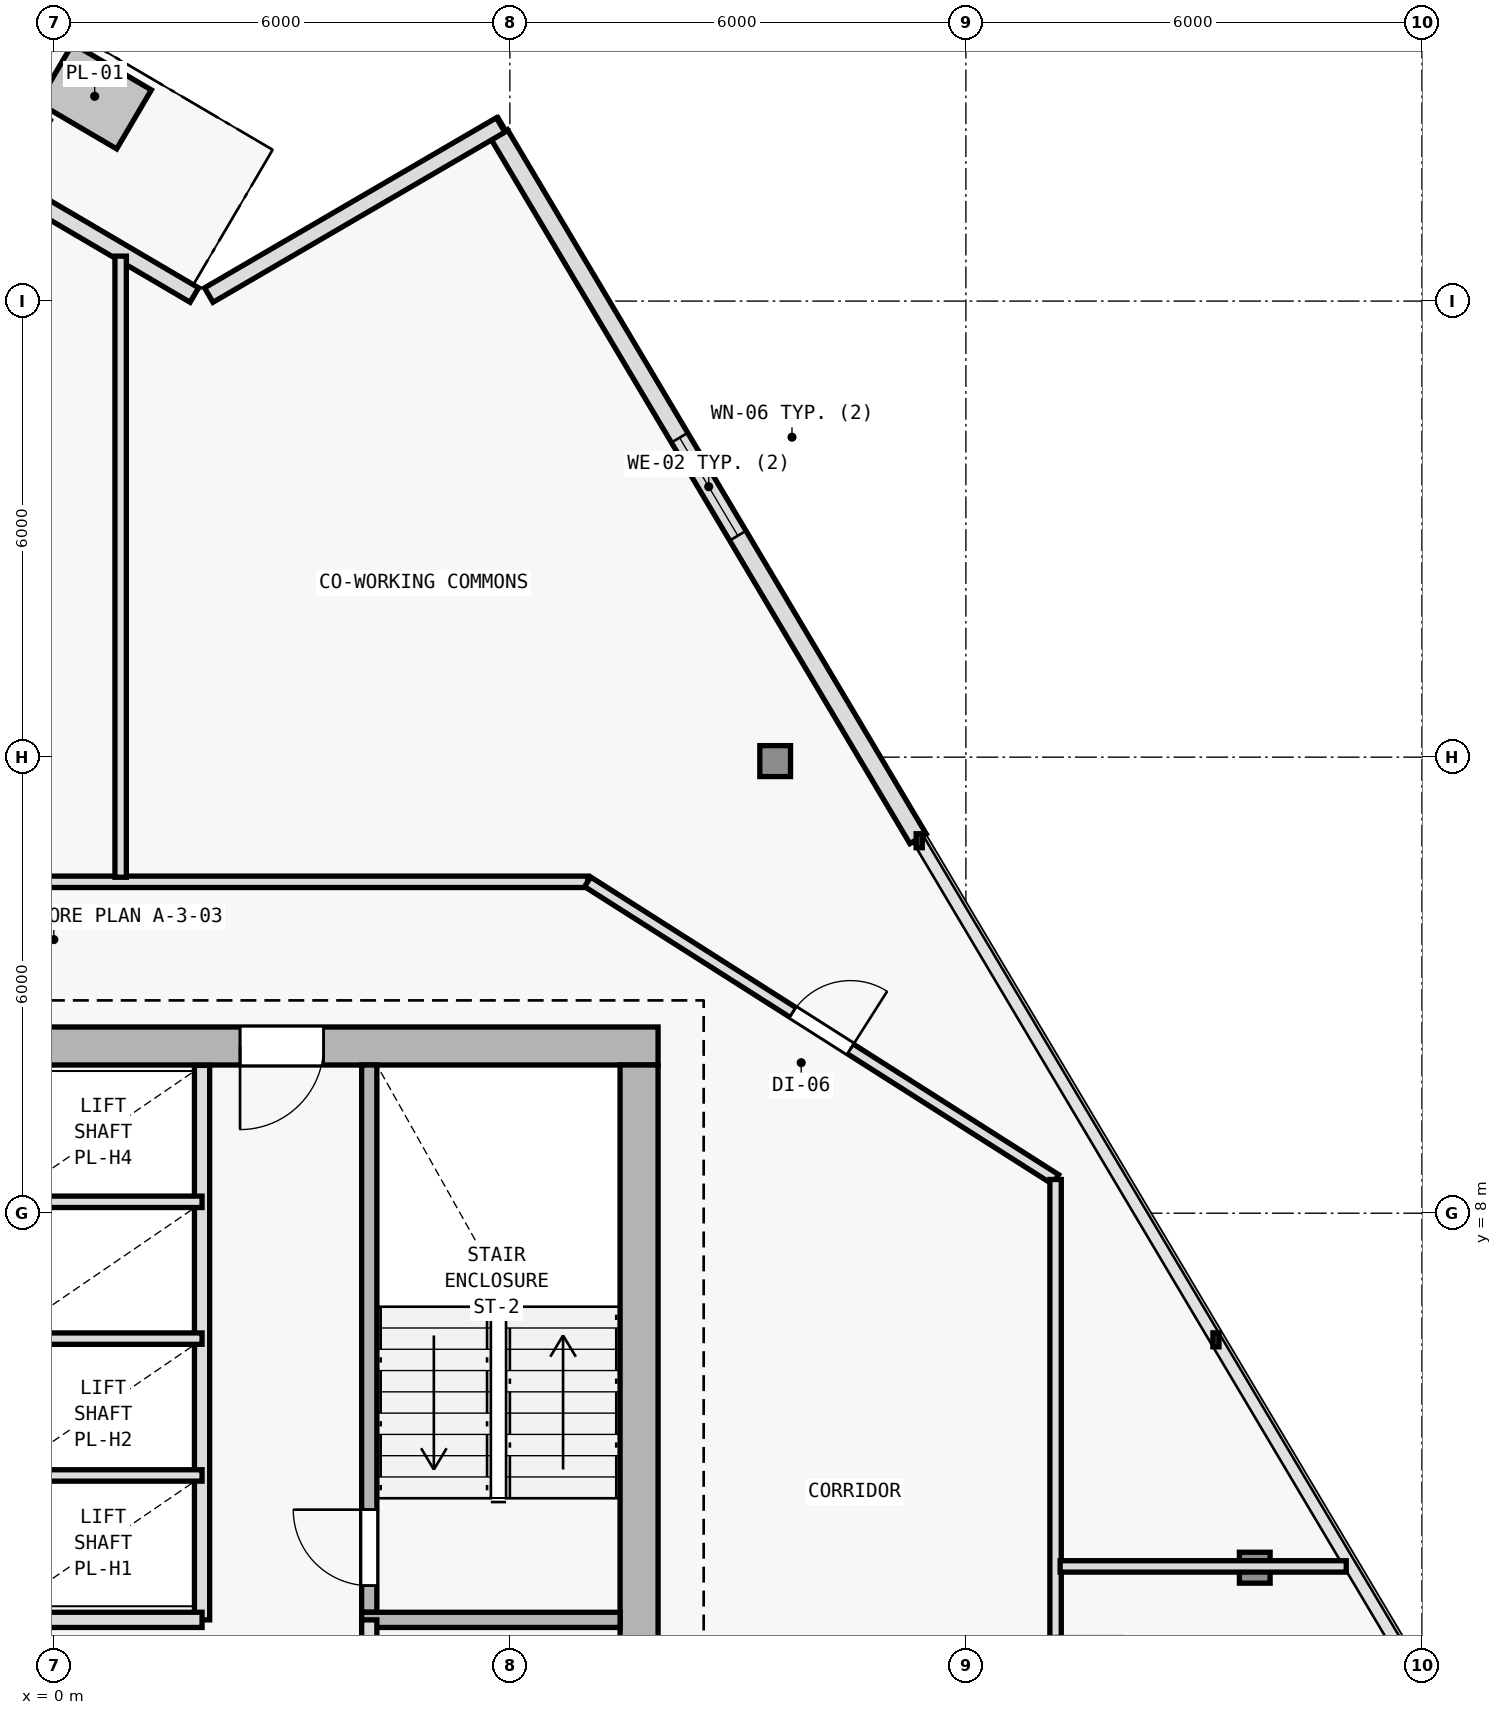
"""IFC4 building model, lengths in metres.
Left out: names, types, materials, properties, quantities, classifications, styles, units other than length and angle.
Written with IfcOpenShell. Run it as: python <this file> out.ifc"""

import sys

from ifc_helpers import new_model, si_unit, direction, frame, frame_2d, origin, origin_2d, place, context, subcontext, project, spatial, rectangle, i_section, extrude, element, fill, save


model = new_model("IFC4")
c1 = context("Model", 3, precision=1e-05, world=origin(), true_north=direction((0.0, 1.0)))
c2 = subcontext(c1, "Body", "Model", "MODEL_VIEW")
j1 = project(units=[si_unit("LENGTHUNIT", "METRE"), si_unit("PLANEANGLEUNIT", "RADIAN")], contexts=[c1])
p1 = place(None, origin())
s1 = spatial("IfcSite", under=j1, at=p1, CompositionType="ELEMENT")
p2 = place(p1, origin())
s2 = spatial("IfcBuilding", under=s1, at=p2, CompositionType="ELEMENT")
p3 = place(p2, frame((0.0, 0.0, 149.4)))
s3 = spatial("IfcBuildingStorey", under=s2, at=p3, CompositionType="ELEMENT", Elevation=149.4)
p4 = place(p3, frame((7.7, 10.2, 0.0), z_axis=(0.0, 0.0, 1.0), x_axis=(1.0, 0.0, 0.0)))
e1 = element("IfcColumn", 1, at=p4, inside=s3, PredefinedType="COLUMN", context=c2, shape_type="SweptSolid", body=[
    extrude(i_section(OverallWidth=0.404, OverallDepth=0.407, WebThickness=0.017, FlangeThickness=0.028, FilletRadius=0.015, at=origin_2d()), origin(), (0.0, 0.0, 1.0), 3.6),
])
p5 = place(p3, frame((15.801, 3.336, 0.006), z_axis=(-0.018907314261, 0.009589680974, 0.999775250487), x_axis=(-0.452339157861, -0.891845999187, 0.0)))
e2 = element("IfcColumn", 2, at=p5, inside=s3, PredefinedType="COLUMN", context=c2, shape_type="SweptSolid", body=[
    extrude(i_section(OverallWidth=0.404, OverallDepth=0.407, WebThickness=0.017, FlangeThickness=0.028, FilletRadius=0.015, at=origin_2d()), origin(), (0.0, 0.0, 1.0), 3.59),
])
p6 = place(p3, frame((9.49, 13.948, 0.006), z_axis=(-0.011699840322, -0.002584848443, 0.999928213571), x_axis=(0.215728093413, -0.976453475447, 0.0)))
e3 = element("IfcColumn", 3, at=p6, inside=s3, PredefinedType="COLUMN", context=c2, shape_type="SweptSolid", body=[
    extrude(i_section(OverallWidth=0.404, OverallDepth=0.407, WebThickness=0.017, FlangeThickness=0.028, FilletRadius=0.015, at=origin_2d()), origin(), (0.0, 0.0, 1.0), 3.589),
])
p7 = place(p3, frame((5.862, 22.19, 0.0), z_axis=(0.0, 0.0, 1.0), x_axis=(0.511083986456, -0.859530778267, 0.0)))
e4 = element("IfcWall", 4, at=p7, inside=s3, PredefinedType="SOLIDWALL", context=c2, shape_type="SweptSolid", body=[
    extrude(rectangle(XDim=10.778, YDim=0.25, at=frame_2d((5.389, 0.0))), origin(), (0.0, 0.0, 1.0), 3.35),
])
p8 = place(p7, frame((4.639, 0.0, 0.62)))
e5 = element("IfcOpeningElement", 5, at=p8, cuts=e4, PredefinedType="OPENING", context=c2, shape_type="SweptSolid", body=[
    extrude(rectangle(XDim=1.5, YDim=2.0, at=frame_2d((0.75, 1.0))), frame((0.0, 0.135, 0.0), z_axis=(0.0, -1.0, 0.0), x_axis=(1.0, 0.0, 0.0)), (0.0, 0.0, 1.0), 0.27),
])
p9 = place(p3, frame((2.039, 20.079, 0.0), z_axis=(0.0, 0.0, 1.0), x_axis=(0.86398603623, 0.503515768571, 0.0)))
e6 = element("IfcWall", 6, at=p9, inside=s3, PredefinedType="SOLIDWALL", context=c2, shape_type="SweptSolid", body=[
    extrude(rectangle(XDim=4.444, YDim=0.22, at=frame_2d((2.222, 0.0))), origin(), (0.0, 0.0, 1.0), 3.35),
])
p10 = place(p3, frame((-2.385, 22.567, 0.0), z_axis=(0.0, 0.0, 1.0), x_axis=(0.8621258938, -0.506694131839, 0.0)))
e7 = element("IfcWall", 7, at=p10, inside=s3, PredefinedType="SOLIDWALL", context=c2, shape_type="SweptSolid", body=[
    extrude(rectangle(XDim=4.91, YDim=0.22, at=frame_2d((2.455, 0.0))), origin(), (0.0, 0.0, 1.0), 3.35),
])
p11 = place(p10, frame((1.08, 0.0, 0.0)))
e8 = element("IfcOpeningElement", 8, at=p11, cuts=e7, PredefinedType="OPENING", context=c2, shape_type="SweptSolid", body=[
    extrude(rectangle(XDim=1.05, YDim=2.15, at=frame_2d((0.525, 1.075))), frame((0.0, 0.12, 0.0), z_axis=(0.0, -1.0, 0.0), x_axis=(1.0, 0.0, 0.0)), (0.0, 0.0, 1.0), 0.24),
])
p12 = place(p3, frame((7.95, 10.2, 0.0), z_axis=(0.0, 0.0, 1.0), x_axis=(-1.0, 0.0, 0.0)))
e9 = element("IfcWall", 9, at=p12, inside=s3, PredefinedType="SHEAR", context=c2, shape_type="SweptSolid", body=[
    extrude(rectangle(XDim=15.9, YDim=0.5, at=frame_2d((7.95, 0.0))), origin(), (0.0, 0.0, 1.0), 3.35),
])
p13 = place(p12, frame((4.4, 0.0, 0.0)))
e10 = element("IfcOpeningElement", 10, at=p13, cuts=e9, PredefinedType="OPENING", context=c2, shape_type="SweptSolid", body=[
    extrude(rectangle(XDim=1.1, YDim=2.15, at=frame_2d((0.55, 1.075))), frame((0.0, 0.26, 0.0), z_axis=(0.0, -1.0, 0.0), x_axis=(1.0, 0.0, 0.0)), (0.0, 0.0, 1.0), 0.52),
])
p14 = place(p3, frame((7.7, 9.95, 0.0), z_axis=(0.0, 0.0, 1.0), x_axis=(0.0, -1.0, 0.0)))
e11 = element("IfcWall", 11, at=p14, inside=s3, PredefinedType="SHEAR", context=c2, shape_type="SweptSolid", body=[
    extrude(rectangle(XDim=19.1, YDim=0.5, at=frame_2d((9.55, 0.0))), origin(), (0.0, 0.0, 1.0), 3.35),
])
p15 = place(p3, frame((4.15, 2.75, 0.0), z_axis=(0.0, 0.0, 1.0), x_axis=(0.0, 1.0, 0.0)))
e12 = element("IfcWall", 12, at=p15, inside=s3, PredefinedType="SOLIDWALL", context=c2, shape_type="SweptSolid", body=[
    extrude(rectangle(XDim=7.2, YDim=0.2, at=frame_2d((3.6, 0.0))), origin(), (0.0, 0.0, 1.0), 3.35),
])
p16 = place(p15, frame((0.35, 0.0, 0.0)))
e13 = element("IfcOpeningElement", 13, at=p16, cuts=e12, PredefinedType="OPENING", context=c2, shape_type="SweptSolid", body=[
    extrude(rectangle(XDim=1.0, YDim=2.15, at=frame_2d((0.5, 1.075))), frame((0.0, 0.11, 0.0), z_axis=(0.0, -1.0, 0.0), x_axis=(1.0, 0.0, 0.0)), (0.0, 0.0, 1.0), 0.22),
])
p17 = place(p3, frame((4.05, 2.65, 0.0), z_axis=(0.0, 0.0, 1.0), x_axis=(1.0, 0.0, 0.0)))
e14 = element("IfcWall", 14, at=p17, inside=s3, PredefinedType="SOLIDWALL", context=c2, shape_type="SweptSolid", body=[
    extrude(rectangle(XDim=3.4, YDim=0.2, at=frame_2d((1.7, 0.0))), origin(), (0.0, 0.0, 1.0), 3.35),
])
p18 = place(p3, frame((4.15, -6.05, 0.0), z_axis=(0.0, 0.0, 1.0), x_axis=(0.0, 1.0, 0.0)))
e15 = element("IfcWall", 15, at=p18, inside=s3, PredefinedType="SOLIDWALL", context=c2, shape_type="SweptSolid", body=[
    extrude(rectangle(XDim=8.7, YDim=0.2, at=frame_2d((4.35, 0.0))), origin(), (0.0, 0.0, 1.0), 3.35),
])
p19 = place(p18, frame((3.6, 0.0, 0.0)))
e16 = element("IfcOpeningElement", 16, at=p19, cuts=e15, PredefinedType="OPENING", context=c2, shape_type="SweptSolid", body=[
    extrude(rectangle(XDim=0.95, YDim=2.1, at=frame_2d((0.475, 1.05))), frame((0.0, 0.11, 0.0), z_axis=(0.0, -1.0, 0.0), x_axis=(1.0, 0.0, 0.0)), (0.0, 0.0, 1.0), 0.22),
])
p20 = place(p3, frame((1.95, 2.65, 0.0), z_axis=(0.0, 0.0, 1.0), x_axis=(0.0, 1.0, 0.0)))
e17 = element("IfcWall", 17, at=p20, inside=s3, PredefinedType="SOLIDWALL", context=c2, shape_type="SweptSolid", body=[
    extrude(rectangle(XDim=7.295, YDim=0.2, at=frame_2d((3.647, 0.0))), origin(), (0.0, 0.0, 1.0), 3.35),
])
p21 = place(p3, frame((-0.95, 2.65, 0.0), z_axis=(0.0, 0.0, 1.0), x_axis=(1.0, 0.0, 0.0)))
e18 = element("IfcWall", 18, at=p21, inside=s3, PredefinedType="SOLIDWALL", context=c2, shape_type="SweptSolid", body=[
    extrude(rectangle(XDim=2.9, YDim=0.2, at=frame_2d((1.45, 0.0))), origin(), (0.0, 0.0, 1.0), 3.35),
])
for number, where, z_axis, x_axis in (
    (19, (-0.75, 4.55, 0.0), (0.0, 0.0, 1.0), (1.0, 0.0, 0.0)),
    (20, (-0.75, 6.35, 0.0), (0.0, 0.0, 1.0), (1.0, 0.0, 0.0)),
    (21, (-0.75, 8.15, 0.0), (0.0, 0.0, 1.0), (1.0, 0.0, 0.0)),
):
    element("IfcWall", number, at=place(p3, frame(where, z_axis=z_axis, x_axis=x_axis)), inside=s3, PredefinedType="PARTITIONING", context=c2, shape_type="SweptSolid", body=[
        extrude(rectangle(XDim=2.7, YDim=0.15, at=frame_2d((1.35, 0.0))), origin(), (0.0, 0.0, 1.0), 3.35),
    ])
p22 = place(p3, frame((-7.041, 12.36, 0.0), z_axis=(0.0, 0.0, 1.0), x_axis=(1.0, 0.0, 0.0)))
e22 = element("IfcWall", 22, at=p22, inside=s3, PredefinedType="PARTITIONING", context=c2, shape_type="SweptSolid", body=[
    extrude(rectangle(XDim=14.064, YDim=0.15, at=frame_2d((7.032, 0.0))), origin(), (0.0, 0.0, 1.0), 2.965),
])
p23 = place(p22, frame((3.599, 0.0, 0.0)))
e23 = element("IfcOpeningElement", 23, at=p23, cuts=e22, PredefinedType="OPENING", context=c2, shape_type="SweptSolid", body=[
    extrude(rectangle(XDim=0.9, YDim=2.1, at=frame_2d((0.45, 1.05))), frame((0.0, 0.085, 0.0), z_axis=(0.0, -1.0, 0.0), x_axis=(1.0, 0.0, 0.0)), (0.0, 0.0, 1.0), 0.17),
])
p24 = place(p3, frame((7.023, 12.36, 0.0), z_axis=(0.0, 0.0, 1.0), x_axis=(0.84376480085, -0.536713108511, 0.0)))
e24 = element("IfcWall", 24, at=p24, inside=s3, PredefinedType="PARTITIONING", context=c2, shape_type="SweptSolid", body=[
    extrude(rectangle(XDim=7.297, YDim=0.15, at=frame_2d((3.648, 0.0))), origin(), (0.0, 0.0, 1.0), 2.775),
])
p25 = place(p24, frame((3.198, 0.0, 0.0)))
e25 = element("IfcOpeningElement", 25, at=p25, cuts=e24, PredefinedType="OPENING", context=c2, shape_type="SweptSolid", body=[
    extrude(rectangle(XDim=0.9, YDim=2.1, at=frame_2d((0.45, 1.05))), frame((0.0, 0.085, 0.0), z_axis=(0.0, -1.0, 0.0), x_axis=(1.0, 0.0, 0.0)), (0.0, 0.0, 1.0), 0.17),
])
p26 = place(p3, frame((13.18, 8.444, 0.0), z_axis=(0.0, 0.0, 1.0), x_axis=(0.0, -1.0, 0.0)))
e26 = element("IfcWall", 26, at=p26, inside=s3, PredefinedType="PARTITIONING", context=c2, shape_type="SweptSolid", body=[
    extrude(rectangle(XDim=20.004, YDim=0.15, at=frame_2d((10.002, 0.0))), origin(), (0.0, 0.0, 1.0), 2.725),
])
p27 = place(p26, frame((17.303, 0.0, 0.0)))
e27 = element("IfcOpeningElement", 27, at=p27, cuts=e26, PredefinedType="OPENING", context=c2, shape_type="SweptSolid", body=[
    extrude(rectangle(XDim=0.9, YDim=2.1, at=frame_2d((0.45, 1.05))), frame((0.0, 0.085, 0.0), z_axis=(0.0, -1.0, 0.0), x_axis=(1.0, 0.0, 0.0)), (0.0, 0.0, 1.0), 0.17),
])
p28 = place(p26, frame((13.731, 0.0, 0.0)))
e28 = element("IfcOpeningElement", 28, at=p28, cuts=e26, PredefinedType="OPENING", context=c2, shape_type="SweptSolid", body=[
    extrude(rectangle(XDim=0.9, YDim=2.1, at=frame_2d((0.45, 1.05))), frame((0.0, 0.085, 0.0), z_axis=(0.0, -1.0, 0.0), x_axis=(1.0, 0.0, 0.0)), (0.0, 0.0, 1.0), 0.17),
])
p29 = place(p26, frame((10.967, 0.0, 0.0)))
e29 = element("IfcOpeningElement", 29, at=p29, cuts=e26, PredefinedType="OPENING", context=c2, shape_type="SweptSolid", body=[
    extrude(rectangle(XDim=0.9, YDim=2.1, at=frame_2d((0.45, 1.05))), frame((0.0, 0.085, 0.0), z_axis=(0.0, -1.0, 0.0), x_axis=(1.0, 0.0, 0.0)), (0.0, 0.0, 1.0), 0.17),
])
p30 = place(p26, frame((8.54, 0.0, 0.0)))
e30 = element("IfcOpeningElement", 30, at=p30, cuts=e26, PredefinedType="OPENING", context=c2, shape_type="SweptSolid", body=[
    extrude(rectangle(XDim=0.9, YDim=2.1, at=frame_2d((0.45, 1.05))), frame((0.0, 0.085, 0.0), z_axis=(0.0, -1.0, 0.0), x_axis=(1.0, 0.0, 0.0)), (0.0, 0.0, 1.0), 0.17),
])
p31 = place(p26, frame((6.009, 0.0, 0.0)))
e31 = element("IfcOpeningElement", 31, at=p31, cuts=e26, PredefinedType="OPENING", context=c2, shape_type="SweptSolid", body=[
    extrude(rectangle(XDim=0.9, YDim=2.1, at=frame_2d((0.45, 1.05))), frame((0.0, 0.085, 0.0), z_axis=(0.0, -1.0, 0.0), x_axis=(1.0, 0.0, 0.0)), (0.0, 0.0, 1.0), 0.17),
])
p32 = place(p3, frame((13.24, 3.354, 0.0), z_axis=(0.0, 0.0, 1.0), x_axis=(1.0, 0.0, 0.0)))
e32 = element("IfcWall", 32, at=p32, inside=s3, PredefinedType="PARTITIONING", context=c2, shape_type="SweptSolid", body=[
    extrude(rectangle(XDim=3.764, YDim=0.15, at=frame_2d((1.882, 0.0))), origin(), (0.0, 0.0, 1.0), 2.885),
])
p33 = place(p3, frame((0.879, 12.42, 0.0), z_axis=(0.0, 0.0, 1.0), x_axis=(0.0, 1.0, 0.0)))
e33 = element("IfcWall", 33, at=p33, inside=s3, PredefinedType="PARTITIONING", context=c2, shape_type="SweptSolid", body=[
    extrude(rectangle(XDim=8.171, YDim=0.15, at=frame_2d((4.086, 0.0))), origin(), (0.0, 0.0, 1.0), 2.885),
])
p34 = place(p8, origin())
e34 = element("IfcWindow", 34, at=p34, inside=s3, PartitioningType="SINGLE_PANEL", PredefinedType="WINDOW", context=c2, shape_type="SweptSolid", body=[
    extrude(rectangle(XDim=1.5, YDim=2.0, at=frame_2d((0.75, 1.0))), frame((0.0, 0.03, 0.0), z_axis=(0.0, -1.0, 0.0), x_axis=(1.0, 0.0, 0.0)), (0.0, 0.0, 1.0), 0.06),
])
fill(e5, e34)
p35 = place(p13, origin())
e35 = element("IfcDoor", 35, at=p35, inside=s3, OperationType="SINGLE_SWING_RIGHT", PredefinedType="DOOR", context=c2, shape_type="SweptSolid", body=[
    extrude(rectangle(XDim=1.1, YDim=2.15, at=frame_2d((0.55, 1.075))), frame((0.0, 0.025, 0.0), z_axis=(0.0, -1.0, 0.0), x_axis=(1.0, 0.0, 0.0)), (0.0, 0.0, 1.0), 0.05),
])
fill(e10, e35)
p36 = place(p16, origin())
e36 = element("IfcDoor", 36, at=p36, inside=s3, OperationType="SINGLE_SWING_RIGHT", PredefinedType="DOOR", context=c2, shape_type="SweptSolid", body=[
    extrude(rectangle(XDim=1.0, YDim=2.15, at=frame_2d((0.5, 1.075))), frame((0.0, 0.025, 0.0), z_axis=(0.0, -1.0, 0.0), x_axis=(1.0, 0.0, 0.0)), (0.0, 0.0, 1.0), 0.05),
])
fill(e13, e36)
p37 = place(p25, origin())
e37 = element("IfcDoor", 37, at=p37, inside=s3, OperationType="SINGLE_SWING_RIGHT", PredefinedType="DOOR", context=c2, shape_type="SweptSolid", body=[
    extrude(rectangle(XDim=0.9, YDim=2.1, at=frame_2d((0.45, 1.05))), frame((0.0, 0.025, 0.0), z_axis=(0.0, -1.0, 0.0), x_axis=(1.0, 0.0, 0.0)), (0.0, 0.0, 1.0), 0.05),
])
fill(e25, e37)
save(model, sys.argv[1])
